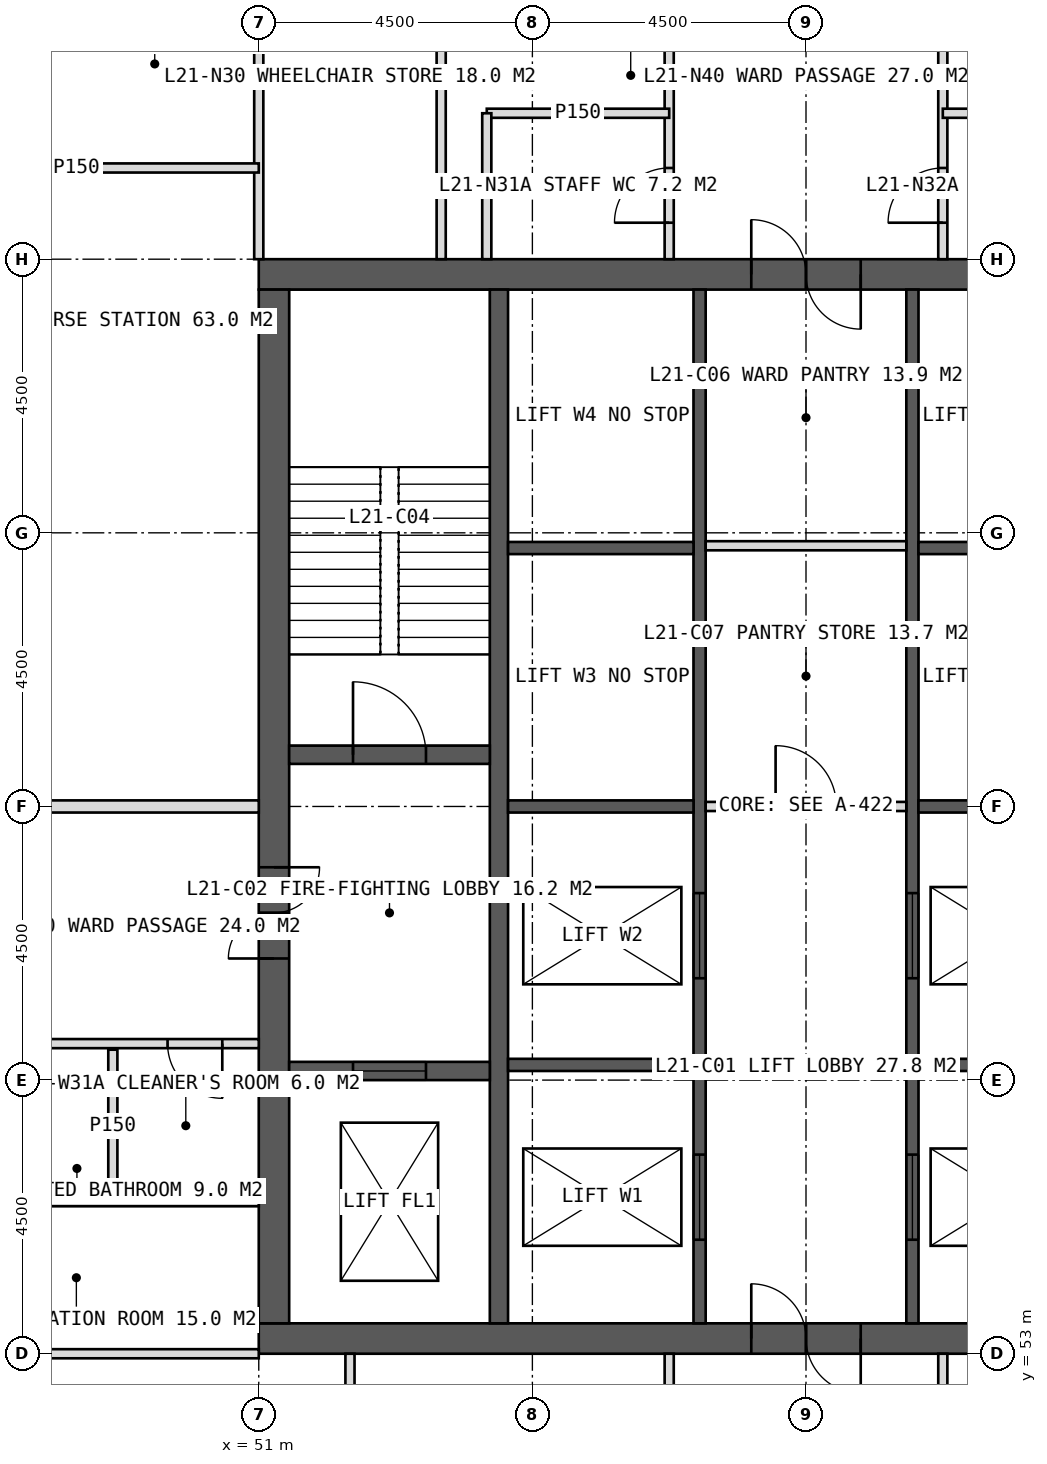
"""IFC4 building model, lengths in metres.
Left out: names, types, materials, properties, quantities, classifications, styles, units other than length and angle.
Written with IfcOpenShell. Run it as: python <this file> out.ifc"""

import sys

from ifc_helpers import new_model, si_unit, direction, frame, frame_2d, origin, place, context, subcontext, project, spatial, rectangle, extrude, element, fill, save


model = new_model("IFC4")
c1 = context("Model", 3, precision=1e-05, world=origin(), true_north=direction((0.0, 1.0)))
c2 = subcontext(c1, "Body", "Model", "MODEL_VIEW")
j1 = project(units=[si_unit("LENGTHUNIT", "METRE"), si_unit("PLANEANGLEUNIT", "RADIAN")], contexts=[c1])
p1 = place(None, origin())
s1 = spatial("IfcSite", under=j1, at=p1, CompositionType="ELEMENT")
p2 = place(p1, origin())
s2 = spatial("IfcBuilding", under=s1, at=p2, CompositionType="ELEMENT")
p3 = place(p2, frame((0.0, 0.0, 91.0)))
s3 = spatial("IfcBuildingStorey", under=s2, at=p3, CompositionType="ELEMENT", Elevation=91.0)
p4 = place(p3, frame((51.0, 70.75, 0.0), z_axis=(0.0, 0.0, 1.0), x_axis=(1.0, 0.0, 0.0)))
e1 = element("IfcWall", 1, at=p4, inside=s3, PredefinedType="SHEAR", context=c2, shape_type="SweptSolid", body=[
    extrude(rectangle(XDim=18.0, YDim=0.5, at=frame_2d((9.0, 0.0))), origin(), (0.0, 0.0, 1.0), 4.0),
])
p5 = place(p4, frame((8.1, 0.0, 0.0)))
e2 = element("IfcOpeningElement", 2, at=p5, cuts=e1, PredefinedType="OPENING", context=c2, shape_type="SweptSolid", body=[
    extrude(rectangle(XDim=1.8, YDim=2.2, at=frame_2d((0.9, 1.1))), frame((0.0, 0.26, 0.0), z_axis=(0.0, -1.0, 0.0), x_axis=(1.0, 0.0, 0.0)), (0.0, 0.0, 1.0), 0.52),
])
p6 = place(p3, frame((51.0, 53.25, 0.0), z_axis=(0.0, 0.0, 1.0), x_axis=(1.0, 0.0, 0.0)))
e3 = element("IfcWall", 3, at=p6, inside=s3, PredefinedType="SHEAR", context=c2, shape_type="SweptSolid", body=[
    extrude(rectangle(XDim=18.0, YDim=0.5, at=frame_2d((9.0, 0.0))), origin(), (0.0, 0.0, 1.0), 4.0),
])
p7 = place(p6, frame((8.1, 0.0, 0.0)))
e4 = element("IfcOpeningElement", 4, at=p7, cuts=e3, PredefinedType="OPENING", context=c2, shape_type="SweptSolid", body=[
    extrude(rectangle(XDim=1.8, YDim=2.2, at=frame_2d((0.9, 1.1))), frame((0.0, 0.26, 0.0), z_axis=(0.0, -1.0, 0.0), x_axis=(1.0, 0.0, 0.0)), (0.0, 0.0, 1.0), 0.52),
])
p8 = place(p3, frame((51.25, 53.5, 0.0), z_axis=(0.0, 0.0, 1.0), x_axis=(0.0, 1.0, 0.0)))
e5 = element("IfcWall", 5, at=p8, inside=s3, PredefinedType="SHEAR", context=c2, shape_type="SweptSolid", body=[
    extrude(rectangle(XDim=17.0, YDim=0.5, at=frame_2d((8.5, 0.0))), origin(), (0.0, 0.0, 1.0), 4.0),
])
p9 = place(p8, frame((6.0, 0.0, 0.0)))
e6 = element("IfcOpeningElement", 6, at=p9, cuts=e5, PredefinedType="OPENING", context=c2, shape_type="SweptSolid", body=[
    extrude(rectangle(XDim=1.5, YDim=2.2, at=frame_2d((0.75, 1.1))), frame((0.0, 0.26, 0.0), z_axis=(0.0, -1.0, 0.0), x_axis=(1.0, 0.0, 0.0)), (0.0, 0.0, 1.0), 0.52),
])
p10 = place(p3, frame((54.95, 53.5, 0.0), z_axis=(0.0, 0.0, 1.0), x_axis=(0.0, 1.0, 0.0)))
e7 = element("IfcWall", 7, at=p10, inside=s3, PredefinedType="SHEAR", context=c2, shape_type="SweptSolid", body=[
    extrude(rectangle(XDim=17.0, YDim=0.3, at=frame_2d((8.5, 0.0))), origin(), (0.0, 0.0, 1.0), 4.0),
])
p11 = place(p3, frame((58.25, 53.5, 0.0), z_axis=(0.0, 0.0, 1.0), x_axis=(0.0, 1.0, 0.0)))
e8 = element("IfcWall", 8, at=p11, inside=s3, PredefinedType="SHEAR", context=c2, shape_type="SweptSolid", body=[
    extrude(rectangle(XDim=17.0, YDim=0.2, at=frame_2d((8.5, 0.0))), origin(), (0.0, 0.0, 1.0), 4.0),
])
p12 = place(p11, frame((1.375, 0.0, 0.0)))
e9 = element("IfcOpeningElement", 9, at=p12, cuts=e8, PredefinedType="OPENING", context=c2, shape_type="SweptSolid", body=[
    extrude(rectangle(XDim=1.4, YDim=2.2, at=frame_2d((0.7, 1.1))), frame((0.0, 0.11, 0.0), z_axis=(0.0, -1.0, 0.0), x_axis=(1.0, 0.0, 0.0)), (0.0, 0.0, 1.0), 0.22),
])
p13 = place(p11, frame((5.675, 0.0, 0.0)))
e10 = element("IfcOpeningElement", 10, at=p13, cuts=e8, PredefinedType="OPENING", context=c2, shape_type="SweptSolid", body=[
    extrude(rectangle(XDim=1.4, YDim=2.2, at=frame_2d((0.7, 1.1))), frame((0.0, 0.11, 0.0), z_axis=(0.0, -1.0, 0.0), x_axis=(1.0, 0.0, 0.0)), (0.0, 0.0, 1.0), 0.22),
])
p14 = place(p3, frame((61.75, 53.5, 0.0), z_axis=(0.0, 0.0, 1.0), x_axis=(0.0, 1.0, 0.0)))
e11 = element("IfcWall", 11, at=p14, inside=s3, PredefinedType="SHEAR", context=c2, shape_type="SweptSolid", body=[
    extrude(rectangle(XDim=17.0, YDim=0.2, at=frame_2d((8.5, 0.0))), origin(), (0.0, 0.0, 1.0), 4.0),
])
p15 = place(p14, frame((1.375, 0.0, 0.0)))
e12 = element("IfcOpeningElement", 12, at=p15, cuts=e11, PredefinedType="OPENING", context=c2, shape_type="SweptSolid", body=[
    extrude(rectangle(XDim=1.4, YDim=2.2, at=frame_2d((0.7, 1.1))), frame((0.0, 0.11, 0.0), z_axis=(0.0, -1.0, 0.0), x_axis=(1.0, 0.0, 0.0)), (0.0, 0.0, 1.0), 0.22),
])
p16 = place(p14, frame((5.675, 0.0, 0.0)))
e13 = element("IfcOpeningElement", 13, at=p16, cuts=e11, PredefinedType="OPENING", context=c2, shape_type="SweptSolid", body=[
    extrude(rectangle(XDim=1.4, YDim=2.2, at=frame_2d((0.7, 1.1))), frame((0.0, 0.11, 0.0), z_axis=(0.0, -1.0, 0.0), x_axis=(1.0, 0.0, 0.0)), (0.0, 0.0, 1.0), 0.22),
])
for number, where, z_axis, x_axis in (
    (14, (55.1, 57.75, 0.0), (0.0, 0.0, 1.0), (1.0, 0.0, 0.0)),
    (15, (61.85, 57.75, 0.0), (0.0, 0.0, 1.0), (1.0, 0.0, 0.0)),
    (16, (55.1, 62.0, 0.0), (0.0, 0.0, 1.0), (1.0, 0.0, 0.0)),
    (17, (61.85, 62.0, 0.0), (0.0, 0.0, 1.0), (1.0, 0.0, 0.0)),
    (18, (55.1, 66.25, 0.0), (0.0, 0.0, 1.0), (1.0, 0.0, 0.0)),
    (19, (61.85, 66.25, 0.0), (0.0, 0.0, 1.0), (1.0, 0.0, 0.0)),
):
    element("IfcWall", number, at=place(p3, frame(where, z_axis=z_axis, x_axis=x_axis)), inside=s3, PredefinedType="SHEAR", context=c2, shape_type="SweptSolid", body=[
        extrude(rectangle(XDim=3.05, YDim=0.2, at=frame_2d((1.525, 0.0))), origin(), (0.0, 0.0, 1.0), 4.0),
    ])
p17 = place(p3, frame((51.5, 62.85, 0.0), z_axis=(0.0, 0.0, 1.0), x_axis=(1.0, 0.0, 0.0)))
e20 = element("IfcWall", 20, at=p17, inside=s3, PredefinedType="SHEAR", context=c2, shape_type="SweptSolid", body=[
    extrude(rectangle(XDim=3.3, YDim=0.3, at=frame_2d((1.65, 0.0))), origin(), (0.0, 0.0, 1.0), 4.0),
])
p18 = place(p17, frame((1.05, 0.0, 0.0)))
e21 = element("IfcOpeningElement", 21, at=p18, cuts=e20, PredefinedType="OPENING", context=c2, shape_type="SweptSolid", body=[
    extrude(rectangle(XDim=1.2, YDim=2.1, at=frame_2d((0.6, 1.05))), frame((0.0, 0.16, 0.0), z_axis=(0.0, -1.0, 0.0), x_axis=(1.0, 0.0, 0.0)), (0.0, 0.0, 1.0), 0.32),
])
p19 = place(p3, frame((51.5, 57.65, 0.0), z_axis=(0.0, 0.0, 1.0), x_axis=(1.0, 0.0, 0.0)))
e22 = element("IfcWall", 22, at=p19, inside=s3, PredefinedType="SHEAR", context=c2, shape_type="SweptSolid", body=[
    extrude(rectangle(XDim=3.3, YDim=0.3, at=frame_2d((1.65, 0.0))), origin(), (0.0, 0.0, 1.0), 4.0),
])
p20 = place(p19, frame((1.05, 0.0, 0.0)))
e23 = element("IfcOpeningElement", 23, at=p20, cuts=e22, PredefinedType="OPENING", context=c2, shape_type="SweptSolid", body=[
    extrude(rectangle(XDim=1.2, YDim=2.2, at=frame_2d((0.6, 1.1))), frame((0.0, 0.16, 0.0), z_axis=(0.0, -1.0, 0.0), x_axis=(1.0, 0.0, 0.0)), (0.0, 0.0, 1.0), 0.32),
])
p21 = place(p3, frame((51.0, 71.0, 0.0), z_axis=(0.0, 0.0, 1.0), x_axis=(0.0, 1.0, 0.0)))
e24 = element("IfcWall", 24, at=p21, inside=s3, PredefinedType="PARTITIONING", context=c2, shape_type="SweptSolid", body=[
    extrude(rectangle(XDim=6.0, YDim=0.15, at=frame_2d((3.0, 0.0))), origin(), (0.0, 0.0, 1.0), 3.75),
])
p22 = place(p3, frame((57.75, 71.0, 0.0), z_axis=(0.0, 0.0, 1.0), x_axis=(0.0, 1.0, 0.0)))
e25 = element("IfcWall", 25, at=p22, inside=s3, PredefinedType="PARTITIONING", context=c2, shape_type="SweptSolid", body=[
    extrude(rectangle(XDim=6.0, YDim=0.15, at=frame_2d((3.0, 0.0))), origin(), (0.0, 0.0, 1.0), 3.75),
])
p23 = place(p22, frame((0.6, 0.0, 0.0)))
e26 = element("IfcOpeningElement", 26, at=p23, cuts=e25, PredefinedType="OPENING", context=c2, shape_type="SweptSolid", body=[
    extrude(rectangle(XDim=0.9, YDim=2.1, at=frame_2d((0.45, 1.05))), frame((0.0, 0.085, 0.0), z_axis=(0.0, -1.0, 0.0), x_axis=(1.0, 0.0, 0.0)), (0.0, 0.0, 1.0), 0.17),
])
p24 = place(p3, frame((62.25, 71.0, 0.0), z_axis=(0.0, 0.0, 1.0), x_axis=(0.0, 1.0, 0.0)))
e27 = element("IfcWall", 27, at=p24, inside=s3, PredefinedType="PARTITIONING", context=c2, shape_type="SweptSolid", body=[
    extrude(rectangle(XDim=6.0, YDim=0.15, at=frame_2d((3.0, 0.0))), origin(), (0.0, 0.0, 1.0), 3.75),
])
p25 = place(p24, frame((0.6, 0.0, 0.0)))
e28 = element("IfcOpeningElement", 28, at=p25, cuts=e27, PredefinedType="OPENING", context=c2, shape_type="SweptSolid", body=[
    extrude(rectangle(XDim=0.9, YDim=2.1, at=frame_2d((0.45, 1.05))), frame((0.0, 0.085, 0.0), z_axis=(0.0, -1.0, 0.0), x_axis=(1.0, 0.0, 0.0)), (0.0, 0.0, 1.0), 0.17),
])
p26 = place(p3, frame((54.0, 71.0, 0.0), z_axis=(0.0, 0.0, 1.0), x_axis=(0.0, 1.0, 0.0)))
e29 = element("IfcWall", 29, at=p26, inside=s3, PredefinedType="PARTITIONING", context=c2, shape_type="SweptSolid", body=[
    extrude(rectangle(XDim=6.0, YDim=0.15, at=frame_2d((3.0, 0.0))), origin(), (0.0, 0.0, 1.0), 3.75),
])
p27 = place(p3, frame((54.75, 73.4, 0.0), z_axis=(0.0, 0.0, 1.0), x_axis=(1.0, 0.0, 0.0)))
e30 = element("IfcWall", 30, at=p27, inside=s3, PredefinedType="PARTITIONING", context=c2, shape_type="SweptSolid", body=[
    extrude(rectangle(XDim=3.0, YDim=0.15, at=frame_2d((1.5, 0.0))), origin(), (0.0, 0.0, 1.0), 3.75),
])
p28 = place(p3, frame((54.75, 71.0, 0.0), z_axis=(0.0, 0.0, 1.0), x_axis=(0.0, 1.0, 0.0)))
e31 = element("IfcWall", 31, at=p28, inside=s3, PredefinedType="PARTITIONING", context=c2, shape_type="SweptSolid", body=[
    extrude(rectangle(XDim=2.4, YDim=0.15, at=frame_2d((1.2, 0.0))), origin(), (0.0, 0.0, 1.0), 3.75),
])
p29 = place(p3, frame((62.25, 73.4, 0.0), z_axis=(0.0, 0.0, 1.0), x_axis=(1.0, 0.0, 0.0)))
e32 = element("IfcWall", 32, at=p29, inside=s3, PredefinedType="PARTITIONING", context=c2, shape_type="SweptSolid", body=[
    extrude(rectangle(XDim=3.0, YDim=0.15, at=frame_2d((1.5, 0.0))), origin(), (0.0, 0.0, 1.0), 3.75),
])
p30 = place(p3, frame((51.0, 53.0, 0.0), z_axis=(0.0, 0.0, 1.0), x_axis=(-1.0, 0.0, 0.0)))
e33 = element("IfcWall", 33, at=p30, inside=s3, PredefinedType="PARTITIONING", context=c2, shape_type="SweptSolid", body=[
    extrude(rectangle(XDim=6.0, YDim=0.15, at=frame_2d((3.0, 0.0))), origin(), (0.0, 0.0, 1.0), 3.75),
])
p31 = place(p3, frame((51.0, 58.1, 0.0), z_axis=(0.0, 0.0, 1.0), x_axis=(-1.0, 0.0, 0.0)))
e34 = element("IfcWall", 34, at=p31, inside=s3, PredefinedType="PARTITIONING", context=c2, shape_type="SweptSolid", body=[
    extrude(rectangle(XDim=6.0, YDim=0.15, at=frame_2d((3.0, 0.0))), origin(), (0.0, 0.0, 1.0), 3.75),
])
p32 = place(p31, frame((0.6, 0.0, 0.0)))
e35 = element("IfcOpeningElement", 35, at=p32, cuts=e34, PredefinedType="OPENING", context=c2, shape_type="SweptSolid", body=[
    extrude(rectangle(XDim=0.9, YDim=2.1, at=frame_2d((0.45, 1.05))), frame((0.0, 0.085, 0.0), z_axis=(0.0, -1.0, 0.0), x_axis=(1.0, 0.0, 0.0)), (0.0, 0.0, 1.0), 0.17),
])
p33 = place(p3, frame((51.0, 62.0, 0.0), z_axis=(0.0, 0.0, 1.0), x_axis=(-1.0, 0.0, 0.0)))
e36 = element("IfcWall", 36, at=p33, inside=s3, PredefinedType="SOLIDWALL", context=c2, shape_type="SweptSolid", body=[
    extrude(rectangle(XDim=6.0, YDim=0.2, at=frame_2d((3.0, 0.0))), origin(), (0.0, 0.0, 1.0), 2.75),
])
for number, where, z_axis, x_axis in (
    (37, (51.0, 55.5, 0.0), (0.0, 0.0, 1.0), (-1.0, 0.0, 0.0)),
    (38, (51.0, 72.5, 0.0), (0.0, 0.0, 1.0), (-1.0, 0.0, 0.0)),
):
    element("IfcWall", number, at=place(p3, frame(where, z_axis=z_axis, x_axis=x_axis)), inside=s3, PredefinedType="PARTITIONING", context=c2, shape_type="SweptSolid", body=[
        extrude(rectangle(XDim=6.0, YDim=0.15, at=frame_2d((3.0, 0.0))), origin(), (0.0, 0.0, 1.0), 3.75),
    ])
p34 = place(p3, frame((48.6, 55.5, 0.0), z_axis=(0.0, 0.0, 1.0), x_axis=(0.0, 1.0, 0.0)))
e39 = element("IfcWall", 39, at=p34, inside=s3, PredefinedType="PARTITIONING", context=c2, shape_type="SweptSolid", body=[
    extrude(rectangle(XDim=2.5, YDim=0.15, at=frame_2d((1.25, 0.0))), origin(), (0.0, 0.0, 1.0), 3.75),
])
p35 = place(p3, frame((62.25, 53.0, 0.0), z_axis=(0.0, 0.0, 1.0), x_axis=(0.0, -1.0, 0.0)))
e40 = element("IfcWall", 40, at=p35, inside=s3, PredefinedType="PARTITIONING", context=c2, shape_type="SweptSolid", body=[
    extrude(rectangle(XDim=6.0, YDim=0.15, at=frame_2d((3.0, 0.0))), origin(), (0.0, 0.0, 1.0), 3.75),
])
p36 = place(p35, frame((0.6, 0.0, 0.0)))
e41 = element("IfcOpeningElement", 41, at=p36, cuts=e40, PredefinedType="OPENING", context=c2, shape_type="SweptSolid", body=[
    extrude(rectangle(XDim=0.9, YDim=2.1, at=frame_2d((0.45, 1.05))), frame((0.0, 0.085, 0.0), z_axis=(0.0, -1.0, 0.0), x_axis=(1.0, 0.0, 0.0)), (0.0, 0.0, 1.0), 0.17),
])
for number, where, z_axis, x_axis in (
    (42, (57.75, 53.0, 0.0), (0.0, 0.0, 1.0), (0.0, -1.0, 0.0)),
    (43, (52.5, 53.0, 0.0), (0.0, 0.0, 1.0), (0.0, -1.0, 0.0)),
):
    element("IfcWall", number, at=place(p3, frame(where, z_axis=z_axis, x_axis=x_axis)), inside=s3, PredefinedType="PARTITIONING", context=c2, shape_type="SweptSolid", body=[
        extrude(rectangle(XDim=6.0, YDim=0.15, at=frame_2d((3.0, 0.0))), origin(), (0.0, 0.0, 1.0), 3.75),
    ])
p37 = place(p3, frame((58.35, 62.0, 0.0), z_axis=(0.0, 0.0, 1.0), x_axis=(1.0, 0.0, 0.0)))
e44 = element("IfcWall", 44, at=p37, inside=s3, PredefinedType="PARTITIONING", context=c2, shape_type="SweptSolid", body=[
    extrude(rectangle(XDim=3.3, YDim=0.15, at=frame_2d((1.65, 0.0))), origin(), (0.0, 0.0, 1.0), 3.75),
])
p38 = place(p37, frame((1.15, 0.0, 0.0)))
e45 = element("IfcOpeningElement", 45, at=p38, cuts=e44, PredefinedType="OPENING", context=c2, shape_type="SweptSolid", body=[
    extrude(rectangle(XDim=1.0, YDim=2.1, at=frame_2d((0.5, 1.05))), frame((0.0, 0.085, 0.0), z_axis=(0.0, -1.0, 0.0), x_axis=(1.0, 0.0, 0.0)), (0.0, 0.0, 1.0), 0.17),
])
p39 = place(p3, frame((58.35, 66.288, 0.0), z_axis=(0.0, 0.0, 1.0), x_axis=(1.0, 0.0, 0.0)))
e46 = element("IfcWall", 46, at=p39, inside=s3, PredefinedType="PARTITIONING", context=c2, shape_type="SweptSolid", body=[
    extrude(rectangle(XDim=3.3, YDim=0.15, at=frame_2d((1.65, 0.0))), origin(), (0.0, 0.0, 1.0), 3.75),
])
p40 = place(p23, origin())
e47 = element("IfcDoor", 47, at=p40, inside=s3, OperationType="SINGLE_SWING_LEFT", PredefinedType="DOOR", context=c2, shape_type="SweptSolid", body=[
    extrude(rectangle(XDim=0.9, YDim=2.1, at=frame_2d((0.45, 1.05))), frame((0.0, 0.025, 0.0), z_axis=(0.0, -1.0, 0.0), x_axis=(1.0, 0.0, 0.0)), (0.0, 0.0, 1.0), 0.05),
])
fill(e26, e47)
p41 = place(p25, origin())
e48 = element("IfcDoor", 48, at=p41, inside=s3, OperationType="SINGLE_SWING_LEFT", PredefinedType="DOOR", context=c2, shape_type="SweptSolid", body=[
    extrude(rectangle(XDim=0.9, YDim=2.1, at=frame_2d((0.45, 1.05))), frame((0.0, 0.025, 0.0), z_axis=(0.0, -1.0, 0.0), x_axis=(1.0, 0.0, 0.0)), (0.0, 0.0, 1.0), 0.05),
])
fill(e28, e48)
p42 = place(p32, origin())
e49 = element("IfcDoor", 49, at=p42, inside=s3, OperationType="SINGLE_SWING_LEFT", PredefinedType="DOOR", context=c2, shape_type="SweptSolid", body=[
    extrude(rectangle(XDim=0.9, YDim=2.1, at=frame_2d((0.45, 1.05))), frame((0.0, 0.025, 0.0), z_axis=(0.0, -1.0, 0.0), x_axis=(1.0, 0.0, 0.0)), (0.0, 0.0, 1.0), 0.05),
])
fill(e35, e49)
p43 = place(p7, origin())
e50 = element("IfcDoor", 50, at=p43, inside=s3, OperationType="DOUBLE_DOOR_SINGLE_SWING", PredefinedType="DOOR", context=c2, shape_type="SweptSolid", body=[
    extrude(rectangle(XDim=1.8, YDim=2.2, at=frame_2d((0.9, 1.1))), frame((0.0, 0.025, 0.0), z_axis=(0.0, -1.0, 0.0), x_axis=(1.0, 0.0, 0.0)), (0.0, 0.0, 1.0), 0.05),
])
fill(e4, e50)
p44 = place(p9, origin())
e51 = element("IfcDoor", 51, at=p44, inside=s3, OperationType="DOUBLE_DOOR_SINGLE_SWING", PredefinedType="DOOR", context=c2, shape_type="SweptSolid", body=[
    extrude(rectangle(XDim=1.5, YDim=2.2, at=frame_2d((0.75, 1.1))), frame((0.0, 0.025, 0.0), z_axis=(0.0, -1.0, 0.0), x_axis=(1.0, 0.0, 0.0)), (0.0, 0.0, 1.0), 0.05),
])
fill(e6, e51)
p45 = place(p18, origin())
e52 = element("IfcDoor", 52, at=p45, inside=s3, OperationType="SINGLE_SWING_LEFT", PredefinedType="DOOR", context=c2, shape_type="SweptSolid", body=[
    extrude(rectangle(XDim=1.2, YDim=2.1, at=frame_2d((0.6, 1.05))), frame((0.0, 0.025, 0.0), z_axis=(0.0, -1.0, 0.0), x_axis=(1.0, 0.0, 0.0)), (0.0, 0.0, 1.0), 0.05),
])
fill(e21, e52)
p46 = place(p20, origin())
e53 = element("IfcDoor", 53, at=p46, inside=s3, OperationType="SLIDING_TO_LEFT", PredefinedType="DOOR", context=c2, shape_type="SweptSolid", body=[
    extrude(rectangle(XDim=1.2, YDim=2.2, at=frame_2d((0.6, 1.1))), frame((0.0, 0.025, 0.0), z_axis=(0.0, -1.0, 0.0), x_axis=(1.0, 0.0, 0.0)), (0.0, 0.0, 1.0), 0.05),
])
fill(e23, e53)
p47 = place(p12, origin())
e54 = element("IfcDoor", 54, at=p47, inside=s3, OperationType="SLIDING_TO_LEFT", PredefinedType="DOOR", context=c2, shape_type="SweptSolid", body=[
    extrude(rectangle(XDim=1.4, YDim=2.2, at=frame_2d((0.7, 1.1))), frame((0.0, 0.025, 0.0), z_axis=(0.0, -1.0, 0.0), x_axis=(1.0, 0.0, 0.0)), (0.0, 0.0, 1.0), 0.05),
])
fill(e9, e54)
p48 = place(p15, origin())
e55 = element("IfcDoor", 55, at=p48, inside=s3, OperationType="SLIDING_TO_LEFT", PredefinedType="DOOR", context=c2, shape_type="SweptSolid", body=[
    extrude(rectangle(XDim=1.4, YDim=2.2, at=frame_2d((0.7, 1.1))), frame((0.0, 0.025, 0.0), z_axis=(0.0, -1.0, 0.0), x_axis=(1.0, 0.0, 0.0)), (0.0, 0.0, 1.0), 0.05),
])
fill(e12, e55)
p49 = place(p13, origin())
e56 = element("IfcDoor", 56, at=p49, inside=s3, OperationType="SLIDING_TO_LEFT", PredefinedType="DOOR", context=c2, shape_type="SweptSolid", body=[
    extrude(rectangle(XDim=1.4, YDim=2.2, at=frame_2d((0.7, 1.1))), frame((0.0, 0.025, 0.0), z_axis=(0.0, -1.0, 0.0), x_axis=(1.0, 0.0, 0.0)), (0.0, 0.0, 1.0), 0.05),
])
fill(e10, e56)
p50 = place(p16, origin())
e57 = element("IfcDoor", 57, at=p50, inside=s3, OperationType="SLIDING_TO_LEFT", PredefinedType="DOOR", context=c2, shape_type="SweptSolid", body=[
    extrude(rectangle(XDim=1.4, YDim=2.2, at=frame_2d((0.7, 1.1))), frame((0.0, 0.025, 0.0), z_axis=(0.0, -1.0, 0.0), x_axis=(1.0, 0.0, 0.0)), (0.0, 0.0, 1.0), 0.05),
])
fill(e13, e57)
p51 = place(p38, origin())
e58 = element("IfcDoor", 58, at=p51, inside=s3, OperationType="SINGLE_SWING_LEFT", PredefinedType="DOOR", context=c2, shape_type="SweptSolid", body=[
    extrude(rectangle(XDim=1.0, YDim=2.1, at=frame_2d((0.5, 1.05))), frame((0.0, 0.025, 0.0), z_axis=(0.0, -1.0, 0.0), x_axis=(1.0, 0.0, 0.0)), (0.0, 0.0, 1.0), 0.05),
])
fill(e45, e58)
p52 = place(p5, origin())
e59 = element("IfcDoor", 59, at=p52, inside=s3, OperationType="DOUBLE_DOOR_SINGLE_SWING", PredefinedType="DOOR", context=c2, shape_type="SweptSolid", body=[
    extrude(rectangle(XDim=1.8, YDim=2.2, at=frame_2d((0.9, 1.1))), frame((0.0, 0.025, 0.0), z_axis=(0.0, -1.0, 0.0), x_axis=(1.0, 0.0, 0.0)), (0.0, 0.0, 1.0), 0.05),
])
fill(e2, e59)
save(model, sys.argv[1])
